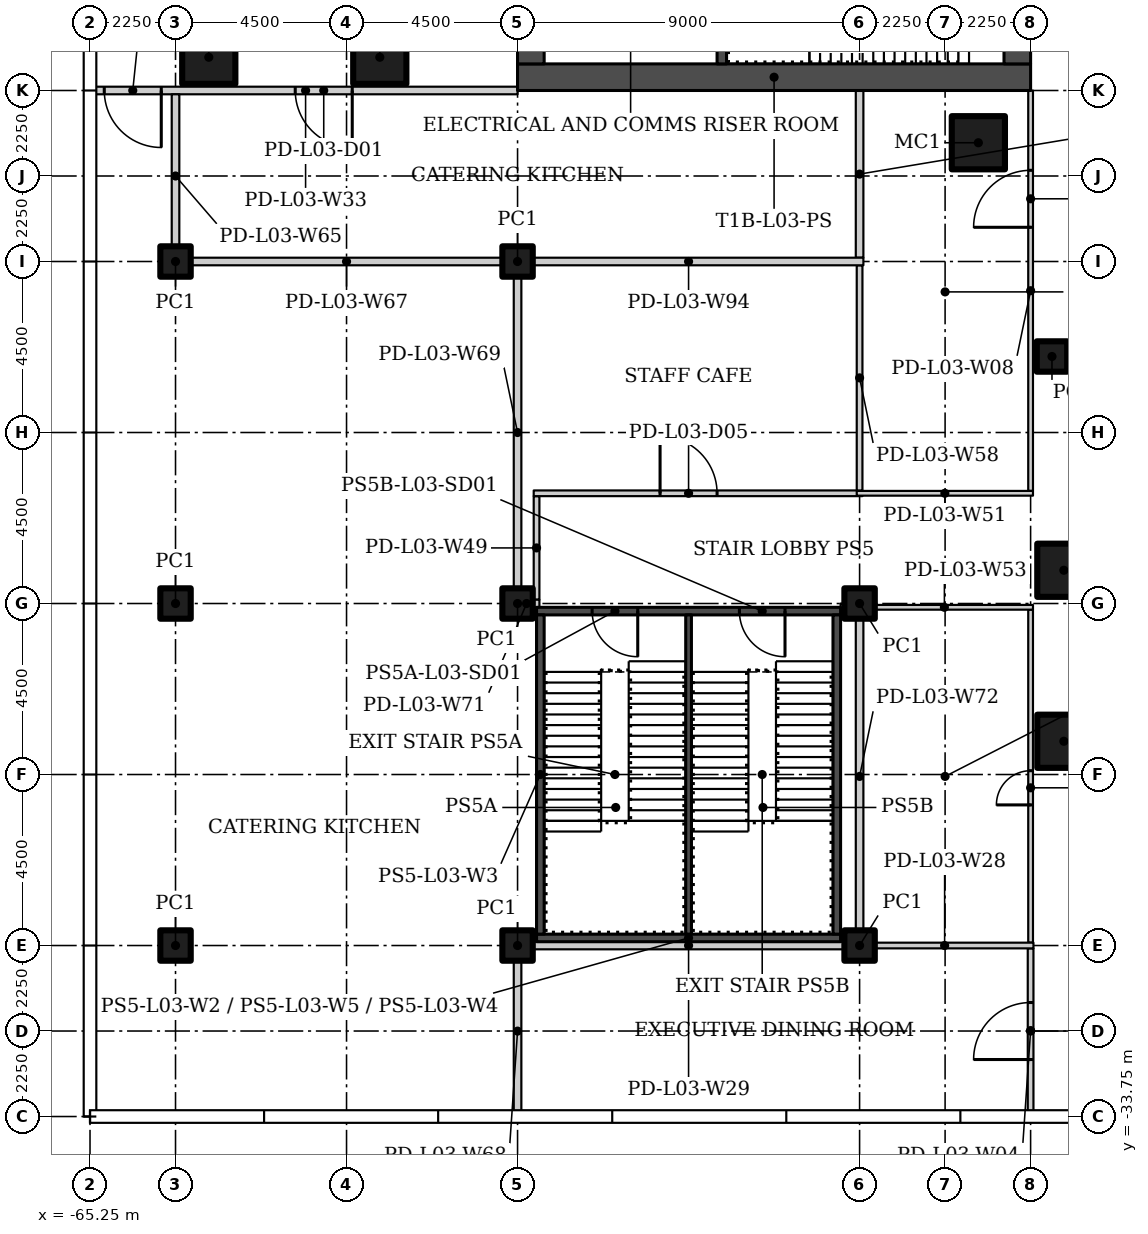
"""IFC4 building model, lengths in metres.
Left out: names, types, materials, properties, quantities, classifications, styles, units other than length and angle.
Written with IfcOpenShell. Run it as: python <this file> out.ifc"""

import sys

from ifc_helpers import new_model, si_unit, direction, frame, frame_2d, origin, origin_2d, place, context, subcontext, project, spatial, rectangle, hollow_rectangle, extrude, element, fill, save


model = new_model("IFC4")
c1 = context("Model", 3, precision=1e-05, world=origin(), true_north=direction((0.0, 1.0)))
c2 = subcontext(c1, "Body", "Model", "MODEL_VIEW")
j1 = project(units=[si_unit("LENGTHUNIT", "METRE"), si_unit("PLANEANGLEUNIT", "RADIAN")], contexts=[c1])
p1 = place(None, origin())
s1 = spatial("IfcSite", under=j1, at=p1, CompositionType="ELEMENT")
p2 = place(p1, origin())
s2 = spatial("IfcBuilding", under=s1, at=p2, CompositionType="ELEMENT")
p3 = place(p2, frame((0.0, 0.0, 18.5)))
s3 = spatial("IfcBuildingStorey", under=s2, at=p3, CompositionType="ELEMENT", Elevation=18.5)
for number, where in (
    (1, (-41.875, -8.125, 0.0)),
    (2, (-57.625, -5.875, 0.0)),
    (3, (-62.125, -5.875, 0.0)),
):
    element("IfcColumn", number, at=place(p3, frame(where)), inside=s3, PredefinedType="COLUMN", context=c2, shape_type="SweptSolid", body=[
        extrude(hollow_rectangle(XDim=1.4, YDim=1.4, WallThickness=0.06, at=origin_2d()), origin(), (0.0, 0.0, 1.0), 4.6),
    ])
p4 = place(p3, frame((-39.938, -13.75, 0.0)))
e4 = element("IfcColumn", 4, at=p4, inside=s3, PredefinedType="COLUMN", context=c2, shape_type="SweptSolid", body=[
    extrude(hollow_rectangle(XDim=0.8, YDim=0.8, WallThickness=0.03, at=origin_2d()), origin(), (0.0, 0.0, 1.0), 4.6),
])
for number, where in (
    (5, (-39.625, -19.375, 0.0)),
    (6, (-39.625, -23.875, 0.0)),
):
    element("IfcColumn", number, at=place(p3, frame(where)), inside=s3, PredefinedType="COLUMN", context=c2, shape_type="SweptSolid", body=[
        extrude(hollow_rectangle(XDim=1.4, YDim=1.4, WallThickness=0.06, at=origin_2d()), origin(), (0.0, 0.0, 1.0), 4.6),
    ])
for number, where in (
    (7, (-63.0, -29.25, 0.0)),
    (8, (-63.0, -20.25, 0.0)),
    (9, (-63.0, -11.25, 0.0)),
    (10, (-54.0, -29.25, 0.0)),
    (11, (-54.0, -20.25, 0.0)),
    (12, (-54.0, -11.25, 0.0)),
    (13, (-45.0, -29.25, 0.0)),
    (14, (-45.0, -20.25, 0.0)),
):
    element("IfcColumn", number, at=place(p3, frame(where)), inside=s3, PredefinedType="COLUMN", context=c2, shape_type="SweptSolid", body=[
        extrude(hollow_rectangle(XDim=0.8, YDim=0.8, WallThickness=0.03, at=origin_2d()), origin(), (0.0, 0.0, 1.0), 4.6),
    ])
p5 = place(p3, frame((-40.5, -33.655, 0.0), z_axis=(0.0, 0.0, 1.0), x_axis=(0.0, 1.0, 0.0)))
e15 = element("IfcWall", 15, at=p5, inside=s3, PredefinedType="PARTITIONING", context=c2, shape_type="SweptSolid", body=[
    extrude(rectangle(XDim=4.33, YDim=0.15, at=frame_2d((2.165, 0.0))), origin(), (0.0, 0.0, 1.0), 4.6),
])
p6 = place(p5, frame((1.405, 0.0, 0.0)))
e16 = element("IfcOpeningElement", 16, at=p6, cuts=e15, PredefinedType="OPENING", context=c2, shape_type="SweptSolid", body=[
    extrude(rectangle(XDim=1.5, YDim=2.4, at=frame_2d((0.75, 1.2))), frame((0.0, 0.085, 0.0), z_axis=(0.0, -1.0, 0.0), x_axis=(1.0, 0.0, 0.0)), (0.0, 0.0, 1.0), 0.17),
])
p7 = place(p3, frame((-40.5, -29.175, 0.0), z_axis=(0.0, 0.0, 1.0), x_axis=(0.0, 1.0, 0.0)))
e17 = element("IfcWall", 17, at=p7, inside=s3, PredefinedType="PARTITIONING", context=c2, shape_type="SweptSolid", body=[
    extrude(rectangle(XDim=8.763, YDim=0.125, at=frame_2d((4.381, 0.0))), origin(), (0.0, 0.0, 1.0), 4.6),
])
p8 = place(p7, frame((3.625, 0.0, 0.0)))
e18 = element("IfcOpeningElement", 18, at=p8, cuts=e17, PredefinedType="OPENING", context=c2, shape_type="SweptSolid", body=[
    extrude(rectangle(XDim=0.9, YDim=2.1, at=frame_2d((0.45, 1.05))), frame((0.0, 0.073, 0.0), z_axis=(0.0, -1.0, 0.0), x_axis=(1.0, 0.0, 0.0)), (0.0, 0.0, 1.0), 0.145),
])
p9 = place(p3, frame((-40.5, -17.287, 0.0), z_axis=(0.0, 0.0, 1.0), x_axis=(0.0, 1.0, 0.0)))
e19 = element("IfcWall", 19, at=p9, inside=s3, PredefinedType="PARTITIONING", context=c2, shape_type="SweptSolid", body=[
    extrude(rectangle(XDim=10.537, YDim=0.125, at=frame_2d((5.269, 0.0))), origin(), (0.0, 0.0, 1.0), 4.6),
])
p10 = place(p9, frame((6.937, 0.0, 0.0)))
e20 = element("IfcOpeningElement", 20, at=p10, cuts=e19, PredefinedType="OPENING", context=c2, shape_type="SweptSolid", body=[
    extrude(rectangle(XDim=1.5, YDim=2.1, at=frame_2d((0.75, 1.05))), frame((0.0, 0.073, 0.0), z_axis=(0.0, -1.0, 0.0), x_axis=(1.0, 0.0, 0.0)), (0.0, 0.0, 1.0), 0.145),
])
p11 = place(p3, frame((-40.425, -29.25, 0.0), z_axis=(0.0, 0.0, 1.0), x_axis=(-1.0, 0.0, 0.0)))
e21 = element("IfcWall", 21, at=p11, inside=s3, PredefinedType="PARTITIONING", context=c2, shape_type="SweptSolid", body=[
    extrude(rectangle(XDim=4.675, YDim=0.15, at=frame_2d((2.337, 0.0))), origin(), (0.0, 0.0, 1.0), 4.6),
])
p12 = place(p3, frame((-54.1, -29.25, 0.0)))
e22 = element("IfcWall", 22, at=p12, inside=s3, PredefinedType="PARTITIONING", context=c2, shape_type="SweptSolid", body=[
    extrude(rectangle(XDim=9.2, YDim=0.2, at=frame_2d((4.6, 0.0))), origin(), (0.0, 0.0, 1.0), 4.6),
])
p13 = place(p3, frame((-54.0, -6.75, 0.0), z_axis=(0.0, 0.0, 1.0), x_axis=(-1.0, 0.0, 0.0)))
e23 = element("IfcWall", 23, at=p13, inside=s3, PredefinedType="PARTITIONING", context=c2, shape_type="SweptSolid", body=[
    extrude(rectangle(XDim=11.155, YDim=0.2, at=frame_2d((5.578, 0.0))), origin(), (0.0, 0.0, 1.0), 4.6),
])
p14 = place(p13, frame((4.35, 0.0, 0.0)))
e24 = element("IfcOpeningElement", 24, at=p14, cuts=e23, PredefinedType="OPENING", context=c2, shape_type="SweptSolid", body=[
    extrude(rectangle(XDim=1.5, YDim=2.4, at=frame_2d((0.75, 1.2))), frame((0.0, 0.11, 0.0), z_axis=(0.0, -1.0, 0.0), x_axis=(1.0, 0.0, 0.0)), (0.0, 0.0, 1.0), 0.22),
])
p15 = place(p13, frame((9.375, 0.0, 0.0)))
e25 = element("IfcOpeningElement", 25, at=p15, cuts=e23, PredefinedType="OPENING", context=c2, shape_type="SweptSolid", body=[
    extrude(rectangle(XDim=1.5, YDim=2.4, at=frame_2d((0.75, 1.2))), frame((0.0, 0.11, 0.0), z_axis=(0.0, -1.0, 0.0), x_axis=(1.0, 0.0, 0.0)), (0.0, 0.0, 1.0), 0.22),
])
p16 = place(p3, frame((-44.9, -20.35, 0.0), z_axis=(0.0, 0.0, 1.0), x_axis=(-1.0, 0.0, 0.0)))
e26 = element("IfcWall", 26, at=p16, inside=s3, PredefinedType="PARTITIONING", context=c2, shape_type="SweptSolid", body=[
    extrude(rectangle(XDim=0.6, YDim=0.2, at=frame_2d((0.3, 0.0))), origin(), (0.0, 0.0, 1.0), 4.6),
])
p17 = place(p3, frame((-53.5, -20.15, 0.0), z_axis=(0.0, 0.0, 1.0), x_axis=(0.0, 1.0, 0.0)))
e27 = element("IfcWall", 27, at=p17, inside=s3, PredefinedType="PARTITIONING", context=c2, shape_type="SweptSolid", body=[
    extrude(rectangle(XDim=2.725, YDim=0.15, at=frame_2d((1.363, 0.0))), origin(), (0.0, 0.0, 1.0), 4.6),
])
p18 = place(p3, frame((-53.575, -17.35, 0.0)))
e28 = element("IfcWall", 28, at=p18, inside=s3, PredefinedType="PARTITIONING", context=c2, shape_type="SweptSolid", body=[
    extrude(rectangle(XDim=8.65, YDim=0.15, at=frame_2d((4.325, 0.0))), origin(), (0.0, 0.0, 1.0), 4.6),
])
p19 = place(p18, frame((3.325, 0.0, 0.0)))
e29 = element("IfcOpeningElement", 29, at=p19, cuts=e28, PredefinedType="OPENING", context=c2, shape_type="SweptSolid", body=[
    extrude(rectangle(XDim=1.5, YDim=2.1, at=frame_2d((0.75, 1.05))), frame((0.0, 0.085, 0.0), z_axis=(0.0, -1.0, 0.0), x_axis=(1.0, 0.0, 0.0)), (0.0, 0.0, 1.0), 0.17),
])
p20 = place(p3, frame((-45.075, -17.35, 0.0)))
e30 = element("IfcWall", 30, at=p20, inside=s3, PredefinedType="PARTITIONING", context=c2, shape_type="SweptSolid", body=[
    extrude(rectangle(XDim=4.637, YDim=0.125, at=frame_2d((2.319, 0.0))), origin(), (0.0, 0.0, 1.0), 4.6),
])
p21 = place(p3, frame((-40.438, -20.35, 0.0), z_axis=(0.0, 0.0, 1.0), x_axis=(-1.0, 0.0, 0.0)))
e31 = element("IfcWall", 31, at=p21, inside=s3, PredefinedType="PARTITIONING", context=c2, shape_type="SweptSolid", body=[
    extrude(rectangle(XDim=4.663, YDim=0.125, at=frame_2d((2.331, 0.0))), origin(), (0.0, 0.0, 1.0), 4.6),
])
p22 = place(p3, frame((-45.0, -17.275, 0.0), z_axis=(0.0, 0.0, 1.0), x_axis=(0.0, 1.0, 0.0)))
e32 = element("IfcWall", 32, at=p22, inside=s3, PredefinedType="PARTITIONING", context=c2, shape_type="SweptSolid", body=[
    extrude(rectangle(XDim=5.925, YDim=0.15, at=frame_2d((2.962, 0.0))), origin(), (0.0, 0.0, 1.0), 4.6),
])
p23 = place(p3, frame((-63.0, -11.15, 0.0), z_axis=(0.0, 0.0, 1.0), x_axis=(0.0, 1.0, 0.0)))
e33 = element("IfcWall", 33, at=p23, inside=s3, PredefinedType="PARTITIONING", context=c2, shape_type="SweptSolid", body=[
    extrude(rectangle(XDim=4.3, YDim=0.2, at=frame_2d((2.15, 0.0))), origin(), (0.0, 0.0, 1.0), 4.6),
])
p24 = place(p3, frame((-53.9, -11.25, 0.0), z_axis=(0.0, 0.0, 1.0), x_axis=(-1.0, 0.0, 0.0)))
e34 = element("IfcWall", 34, at=p24, inside=s3, PredefinedType="PARTITIONING", context=c2, shape_type="SweptSolid", body=[
    extrude(rectangle(XDim=9.2, YDim=0.2, at=frame_2d((4.6, 0.0))), origin(), (0.0, 0.0, 1.0), 4.6),
])
p25 = place(p3, frame((-54.0, -33.655, 0.0), z_axis=(0.0, 0.0, 1.0), x_axis=(0.0, 1.0, 0.0)))
e35 = element("IfcWall", 35, at=p25, inside=s3, PredefinedType="PARTITIONING", context=c2, shape_type="SweptSolid", body=[
    extrude(rectangle(XDim=4.305, YDim=0.2, at=frame_2d((2.152, 0.0))), origin(), (0.0, 0.0, 1.0), 4.6),
])
p26 = place(p3, frame((-54.0, -20.15, 0.0), z_axis=(0.0, 0.0, 1.0), x_axis=(0.0, 1.0, 0.0)))
e36 = element("IfcWall", 36, at=p26, inside=s3, PredefinedType="PARTITIONING", context=c2, shape_type="SweptSolid", body=[
    extrude(rectangle(XDim=8.8, YDim=0.2, at=frame_2d((4.4, 0.0))), origin(), (0.0, 0.0, 1.0), 4.6),
])
p27 = place(p3, frame((-53.425, -20.25, 0.0), z_axis=(0.0, 0.0, 1.0), x_axis=(-1.0, 0.0, 0.0)))
e37 = element("IfcWall", 37, at=p27, inside=s3, PredefinedType="PARTITIONING", context=c2, shape_type="SweptSolid", body=[
    extrude(rectangle(XDim=0.675, YDim=0.2, at=frame_2d((0.337, 0.0))), origin(), (0.0, 0.0, 1.0), 4.6),
])
p28 = place(p3, frame((-45.0, -29.15, 0.0), z_axis=(0.0, 0.0, 1.0), x_axis=(0.0, 1.0, 0.0)))
e38 = element("IfcWall", 38, at=p28, inside=s3, PredefinedType="PARTITIONING", context=c2, shape_type="SweptSolid", body=[
    extrude(rectangle(XDim=8.7, YDim=0.2, at=frame_2d((4.35, 0.0))), origin(), (0.0, 0.0, 1.0), 4.6),
])
p29 = place(p3, frame((-45.0, -11.15, 0.0), z_axis=(0.0, 0.0, 1.0), x_axis=(0.0, 1.0, 0.0)))
e39 = element("IfcWall", 39, at=p29, inside=s3, PredefinedType="PARTITIONING", context=c2, shape_type="SweptSolid", body=[
    extrude(rectangle(XDim=4.4, YDim=0.2, at=frame_2d((2.2, 0.0))), origin(), (0.0, 0.0, 1.0), 4.6),
])
p30 = place(p3, frame((-54.1, -11.25, 0.0)))
e40 = element("IfcWall", 40, at=p30, inside=s3, PredefinedType="PARTITIONING", context=c2, shape_type="SweptSolid", body=[
    extrude(rectangle(XDim=9.2, YDim=0.2, at=frame_2d((4.6, 0.0))), origin(), (0.0, 0.0, 1.0), 4.6),
])
p31 = place(p3, frame((-40.5, -6.4, 0.0), z_axis=(0.0, 0.0, 1.0), x_axis=(-1.0, 0.0, 0.0)))
e41 = element("IfcWall", 41, at=p31, inside=s3, PredefinedType="SHEAR", context=c2, shape_type="SweptSolid", body=[
    extrude(rectangle(XDim=13.5, YDim=0.7, at=frame_2d((6.75, 0.0))), origin(), (0.0, 0.0, 1.0), 4.6),
])
p32 = place(p3, frame((-40.85, -6.05, 0.0), z_axis=(0.0, 0.0, 1.0), x_axis=(0.0, 1.0, 0.0)))
e42 = element("IfcWall", 42, at=p32, inside=s3, PredefinedType="SHEAR", context=c2, shape_type="SweptSolid", body=[
    extrude(rectangle(XDim=12.1, YDim=0.7, at=frame_2d((6.05, 0.0))), origin(), (0.0, 0.0, 1.0), 4.6),
])
p33 = place(p32, frame((6.4, 0.0, 0.0)))
e43 = element("IfcOpeningElement", 43, at=p33, cuts=e42, PredefinedType="OPENING", context=c2, shape_type="SweptSolid", body=[
    extrude(rectangle(XDim=1.8, YDim=2.4, at=frame_2d((0.9, 1.2))), frame((0.0, 0.36, 0.0), z_axis=(0.0, -1.0, 0.0), x_axis=(1.0, 0.0, 0.0)), (0.0, 0.0, 1.0), 0.72),
])
p34 = place(p3, frame((-53.65, -6.05, 0.0), z_axis=(0.0, 0.0, 1.0), x_axis=(0.0, 1.0, 0.0)))
e44 = element("IfcWall", 44, at=p34, inside=s3, PredefinedType="SHEAR", context=c2, shape_type="SweptSolid", body=[
    extrude(rectangle(XDim=12.1, YDim=0.7, at=frame_2d((6.05, 0.0))), origin(), (0.0, 0.0, 1.0), 4.6),
])
p35 = place(p34, frame((0.8, 0.0, 0.0)))
e45 = element("IfcOpeningElement", 45, at=p35, cuts=e44, PredefinedType="OPENING", context=c2, shape_type="SweptSolid", body=[
    extrude(rectangle(XDim=1.2, YDim=2.1, at=frame_2d((0.6, 1.05))), frame((0.0, 0.36, 0.0), z_axis=(0.0, -1.0, 0.0), x_axis=(1.0, 0.0, 0.0)), (0.0, 0.0, 1.0), 0.72),
])
p36 = place(p34, frame((6.4, 0.0, 0.0)))
e46 = element("IfcOpeningElement", 46, at=p36, cuts=e44, PredefinedType="OPENING", context=c2, shape_type="SweptSolid", body=[
    extrude(rectangle(XDim=1.8, YDim=2.4, at=frame_2d((0.9, 1.2))), frame((0.0, 0.36, 0.0), z_axis=(0.0, -1.0, 0.0), x_axis=(1.0, 0.0, 0.0)), (0.0, 0.0, 1.0), 0.72),
])
p37 = place(p3, frame((-48.625, -6.05, 0.0), z_axis=(0.0, 0.0, 1.0), x_axis=(0.0, 1.0, 0.0)))
e47 = element("IfcWall", 47, at=p37, inside=s3, PredefinedType="SHEAR", context=c2, shape_type="SweptSolid", body=[
    extrude(rectangle(XDim=2.55, YDim=0.25, at=frame_2d((1.275, 0.0))), origin(), (0.0, 0.0, 1.0), 4.6),
])
p38 = place(p3, frame((-45.5, -20.45, 0.0), z_axis=(0.0, 0.0, 1.0), x_axis=(-1.0, 0.0, 0.0)))
e48 = element("IfcWall", 48, at=p38, inside=s3, PredefinedType="SHEAR", context=c2, shape_type="SweptSolid", body=[
    extrude(rectangle(XDim=8.0, YDim=0.2, at=frame_2d((4.0, 0.0))), origin(), (0.0, 0.0, 1.0), 4.6),
])
p39 = place(p38, frame((5.337, 0.0, 0.0)))
e49 = element("IfcOpeningElement", 49, at=p39, cuts=e48, PredefinedType="OPENING", context=c2, shape_type="SweptSolid", body=[
    extrude(rectangle(XDim=1.2, YDim=2.4, at=frame_2d((0.6, 1.2))), frame((0.0, 0.11, 0.0), z_axis=(0.0, -1.0, 0.0), x_axis=(1.0, 0.0, 0.0)), (0.0, 0.0, 1.0), 0.22),
])
p40 = place(p38, frame((1.462, 0.0, 0.0)))
e50 = element("IfcOpeningElement", 50, at=p40, cuts=e48, PredefinedType="OPENING", context=c2, shape_type="SweptSolid", body=[
    extrude(rectangle(XDim=1.2, YDim=2.4, at=frame_2d((0.6, 1.2))), frame((0.0, 0.11, 0.0), z_axis=(0.0, -1.0, 0.0), x_axis=(1.0, 0.0, 0.0)), (0.0, 0.0, 1.0), 0.22),
])
p41 = place(p3, frame((-53.5, -29.05, 0.0)))
e51 = element("IfcWall", 51, at=p41, inside=s3, PredefinedType="SHEAR", context=c2, shape_type="SweptSolid", body=[
    extrude(rectangle(XDim=8.0, YDim=0.2, at=frame_2d((4.0, 0.0))), origin(), (0.0, 0.0, 1.0), 4.6),
])
for number, where, z_axis, x_axis in (
    (52, (-53.4, -28.95, 0.0), (0.0, 0.0, 1.0), (0.0, 1.0, 0.0)),
    (53, (-45.6, -28.95, 0.0), (0.0, 0.0, 1.0), (0.0, 1.0, 0.0)),
):
    element("IfcWall", number, at=place(p3, frame(where, z_axis=z_axis, x_axis=x_axis)), inside=s3, PredefinedType="SHEAR", context=c2, shape_type="SweptSolid", body=[
        extrude(rectangle(XDim=8.4, YDim=0.2, at=frame_2d((4.2, 0.0))), origin(), (0.0, 0.0, 1.0), 4.6),
    ])
p42 = place(p3, frame((-49.5, -28.95, 0.0), z_axis=(0.0, 0.0, 1.0), x_axis=(0.0, 1.0, 0.0)))
e54 = element("IfcWall", 54, at=p42, inside=s3, PredefinedType="SHEAR", context=c2, shape_type="SweptSolid", body=[
    extrude(rectangle(XDim=8.4, YDim=0.15, at=frame_2d((4.2, 0.0))), origin(), (0.0, 0.0, 1.0), 4.6),
])
p43 = place(p14, origin())
e55 = element("IfcDoor", 55, at=p43, inside=s3, OperationType="DOUBLE_DOOR_SINGLE_SWING", PredefinedType="DOOR", context=c2, shape_type="SweptSolid", body=[
    extrude(rectangle(XDim=1.5, YDim=2.4, at=frame_2d((0.75, 1.2))), frame((0.0, 0.025, 0.0), z_axis=(0.0, -1.0, 0.0), x_axis=(1.0, 0.0, 0.0)), (0.0, 0.0, 1.0), 0.05),
])
fill(e24, e55)
p44 = place(p15, origin())
e56 = element("IfcDoor", 56, at=p44, inside=s3, OperationType="DOUBLE_DOOR_SINGLE_SWING", PredefinedType="DOOR", context=c2, shape_type="SweptSolid", body=[
    extrude(rectangle(XDim=1.5, YDim=2.4, at=frame_2d((0.75, 1.2))), frame((0.0, 0.025, 0.0), z_axis=(0.0, -1.0, 0.0), x_axis=(1.0, 0.0, 0.0)), (0.0, 0.0, 1.0), 0.05),
])
fill(e25, e56)
p45 = place(p19, origin())
e57 = element("IfcDoor", 57, at=p45, inside=s3, OperationType="DOUBLE_DOOR_SINGLE_SWING", PredefinedType="DOOR", context=c2, shape_type="SweptSolid", body=[
    extrude(rectangle(XDim=1.5, YDim=2.1, at=frame_2d((0.75, 1.05))), frame((0.0, 0.025, 0.0), z_axis=(0.0, -1.0, 0.0), x_axis=(1.0, 0.0, 0.0)), (0.0, 0.0, 1.0), 0.05),
])
fill(e29, e57)
p46 = place(p6, origin())
e58 = element("IfcDoor", 58, at=p46, inside=s3, OperationType="DOUBLE_DOOR_SINGLE_SWING", PredefinedType="DOOR", context=c2, shape_type="SweptSolid", body=[
    extrude(rectangle(XDim=1.5, YDim=2.4, at=frame_2d((0.75, 1.2))), frame((0.0, 0.025, 0.0), z_axis=(0.0, -1.0, 0.0), x_axis=(1.0, 0.0, 0.0)), (0.0, 0.0, 1.0), 0.05),
])
fill(e16, e58)
p47 = place(p8, origin())
e59 = element("IfcDoor", 59, at=p47, inside=s3, OperationType="SINGLE_SWING_LEFT", PredefinedType="DOOR", context=c2, shape_type="SweptSolid", body=[
    extrude(rectangle(XDim=0.9, YDim=2.1, at=frame_2d((0.45, 1.05))), frame((0.0, 0.025, 0.0), z_axis=(0.0, -1.0, 0.0), x_axis=(1.0, 0.0, 0.0)), (0.0, 0.0, 1.0), 0.05),
])
fill(e18, e59)
p48 = place(p10, origin())
e60 = element("IfcDoor", 60, at=p48, inside=s3, OperationType="DOUBLE_DOOR_SINGLE_SWING", PredefinedType="DOOR", context=c2, shape_type="SweptSolid", body=[
    extrude(rectangle(XDim=1.5, YDim=2.1, at=frame_2d((0.75, 1.05))), frame((0.0, 0.025, 0.0), z_axis=(0.0, -1.0, 0.0), x_axis=(1.0, 0.0, 0.0)), (0.0, 0.0, 1.0), 0.05),
])
fill(e20, e60)
p49 = place(p39, origin())
e61 = element("IfcDoor", 61, at=p49, inside=s3, OperationType="SINGLE_SWING_LEFT", PredefinedType="DOOR", context=c2, shape_type="SweptSolid", body=[
    extrude(rectangle(XDim=1.2, YDim=2.4, at=frame_2d((0.6, 1.2))), frame((0.0, 0.025, 0.0), z_axis=(0.0, -1.0, 0.0), x_axis=(1.0, 0.0, 0.0)), (0.0, 0.0, 1.0), 0.05),
])
fill(e49, e61)
p50 = place(p40, origin())
e62 = element("IfcDoor", 62, at=p50, inside=s3, OperationType="SINGLE_SWING_RIGHT", PredefinedType="DOOR", context=c2, shape_type="SweptSolid", body=[
    extrude(rectangle(XDim=1.2, YDim=2.4, at=frame_2d((0.6, 1.2))), frame((0.0, 0.025, 0.0), z_axis=(0.0, -1.0, 0.0), x_axis=(1.0, 0.0, 0.0)), (0.0, 0.0, 1.0), 0.05),
])
fill(e50, e62)
save(model, sys.argv[1])
